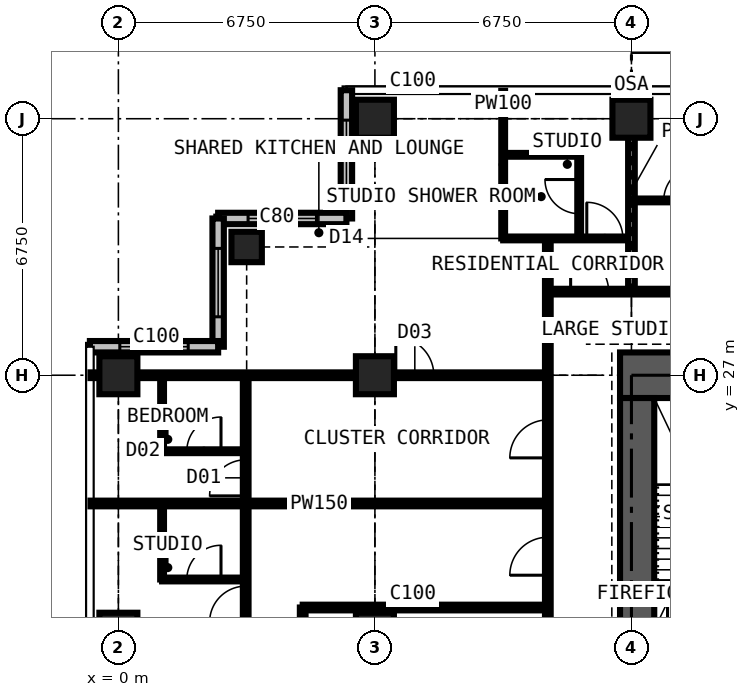
"""IFC4 building model, lengths in metres.
Left out: names, types, materials, properties, quantities, classifications, styles, units other than length and angle.
Written with IfcOpenShell. Run it as: python <this file> out.ifc"""

import sys

from ifc_helpers import new_model, si_unit, direction, frame, frame_2d, origin, origin_2d, place, context, subcontext, project, spatial, rectangle, extrude, element, fill, save


model = new_model("IFC4")
c1 = context("Model", 3, precision=1e-05, world=origin(), true_north=direction((0.0, 1.0)))
c2 = subcontext(c1, "Body", "Model", "MODEL_VIEW")
j1 = project(units=[si_unit("LENGTHUNIT", "METRE"), si_unit("PLANEANGLEUNIT", "RADIAN")], contexts=[c1])
p1 = place(None, origin())
s1 = spatial("IfcSite", under=j1, at=p1, CompositionType="ELEMENT")
p2 = place(p1, origin())
s2 = spatial("IfcBuilding", under=s1, at=p2, CompositionType="ELEMENT")
p3 = place(p2, frame((0.0, 0.0, 229.5)))
s3 = spatial("IfcBuildingStorey", under=s2, at=p3, CompositionType="ELEMENT", Elevation=229.5)
for number, where, z_axis, x_axis in (
    (1, (0.0, 20.25, 0.0), (0.0, 0.0, 1.0), (1.0, 0.0, 0.0)),
    (2, (0.0, 27.0, 0.0), (0.0, 0.0, 1.0), (1.0, 0.0, 0.0)),
):
    element("IfcColumn", number, at=place(p3, frame(where, z_axis=z_axis, x_axis=x_axis)), inside=s3, PredefinedType="COLUMN", context=c2, shape_type="SweptSolid", body=[
        extrude(rectangle(XDim=1.0, YDim=1.0, at=origin_2d()), origin(), (0.0, 0.0, 1.0), 3.6),
    ])
p4 = place(p3, frame((3.375, 30.375, 0.0), z_axis=(0.0, 0.0, 1.0), x_axis=(1.0, 0.0, 0.0)))
e3 = element("IfcColumn", 3, at=p4, inside=s3, PredefinedType="COLUMN", context=c2, shape_type="SweptSolid", body=[
    extrude(rectangle(XDim=0.8, YDim=0.8, at=origin_2d()), origin(), (0.0, 0.0, 1.0), 3.6),
])
for number, where, z_axis, x_axis in (
    (4, (6.75, 20.25, 0.0), (0.0, 0.0, 1.0), (1.0, 0.0, 0.0)),
    (5, (6.75, 27.0, 0.0), (0.0, 0.0, 1.0), (1.0, 0.0, 0.0)),
    (6, (6.75, 33.75, 0.0), (0.0, 0.0, 1.0), (1.0, 0.0, 0.0)),
    (7, (13.5, 33.75, 0.0), (0.0, 0.0, 1.0), (1.0, 0.0, 0.0)),
):
    element("IfcColumn", number, at=place(p3, frame(where, z_axis=z_axis, x_axis=x_axis)), inside=s3, PredefinedType="COLUMN", context=c2, shape_type="SweptSolid", body=[
        extrude(rectangle(XDim=1.0, YDim=1.0, at=origin_2d()), origin(), (0.0, 0.0, 1.0), 3.6),
    ])
p5 = place(p3, frame((27.3, 27.0, 0.0), z_axis=(0.0, 0.0, 1.0), x_axis=(-1.0, 0.0, 0.0)))
e8 = element("IfcWall", 8, at=p5, inside=s3, PredefinedType="SHEAR", context=c2, shape_type="SweptSolid", body=[
    extrude(rectangle(XDim=14.1, YDim=1.2, at=frame_2d((7.05, 0.0))), origin(), (0.0, 0.0, 1.0), 3.6),
])
p6 = place(p5, frame((5.225, 0.0, 0.0)))
e9 = element("IfcOpeningElement", 9, at=p6, cuts=e8, PredefinedType="OPENING", context=c2, shape_type="SweptSolid", body=[
    extrude(rectangle(XDim=0.9, YDim=2.2, at=frame_2d((0.45, 1.1))), frame((0.0, 0.61, 0.0), z_axis=(0.0, -1.0, 0.0), x_axis=(1.0, 0.0, 0.0)), (0.0, 0.0, 1.0), 1.22),
])
p7 = place(p5, frame((8.2, 0.0, 0.0)))
e10 = element("IfcOpeningElement", 10, at=p7, cuts=e8, PredefinedType="OPENING", context=c2, shape_type="SweptSolid", body=[
    extrude(rectangle(XDim=1.0, YDim=2.2, at=frame_2d((0.5, 1.1))), frame((0.0, 0.61, 0.0), z_axis=(0.0, -1.0, 0.0), x_axis=(1.0, 0.0, 0.0)), (0.0, 0.0, 1.0), 1.22),
])
p8 = place(p3, frame((13.65, 26.4, 0.0), z_axis=(0.0, 0.0, 1.0), x_axis=(0.0, -1.0, 0.0)))
e11 = element("IfcWall", 11, at=p8, inside=s3, PredefinedType="SHEAR", context=c2, shape_type="SweptSolid", body=[
    extrude(rectangle(XDim=12.3, YDim=0.9, at=frame_2d((6.15, 0.0))), origin(), (0.0, 0.0, 1.0), 3.6),
])
p9 = place(p8, frame((7.45, 0.0, 0.0)))
e12 = element("IfcOpeningElement", 12, at=p9, cuts=e11, PredefinedType="OPENING", context=c2, shape_type="SweptSolid", body=[
    extrude(rectangle(XDim=1.2, YDim=2.2, at=frame_2d((0.6, 1.1))), frame((0.0, 0.46, 0.0), z_axis=(0.0, -1.0, 0.0), x_axis=(1.0, 0.0, 0.0)), (0.0, 0.0, 1.0), 0.92),
])
p10 = place(p3, frame((6.0, 34.5, 0.0), z_axis=(0.0, 0.0, 1.0), x_axis=(0.0, -1.0, 0.0)))
e13 = element("IfcWall", 13, at=p10, inside=s3, PredefinedType="SOLIDWALL", context=c2, shape_type="SweptSolid", body=[
    extrude(rectangle(XDim=3.375, YDim=0.3, at=frame_2d((1.688, 0.0))), origin(), (0.0, 0.0, 1.0), 3.375),
])
p11 = place(p10, frame((0.788, 0.0, 0.6)))
e14 = element("IfcOpeningElement", 14, at=p11, cuts=e13, PredefinedType="OPENING", context=c2, shape_type="SweptSolid", body=[
    extrude(rectangle(XDim=1.8, YDim=2.1, at=frame_2d((0.9, 1.05))), frame((0.0, 0.16, 0.0), z_axis=(0.0, -1.0, 0.0), x_axis=(1.0, 0.0, 0.0)), (0.0, 0.0, 1.0), 0.32),
])
p12 = place(p3, frame((6.0, 31.125, 0.0), z_axis=(0.0, 0.0, 1.0), x_axis=(-1.0, 0.0, 0.0)))
e15 = element("IfcWall", 15, at=p12, inside=s3, PredefinedType="SOLIDWALL", context=c2, shape_type="SweptSolid", body=[
    extrude(rectangle(XDim=3.375, YDim=0.3, at=frame_2d((1.688, 0.0))), origin(), (0.0, 0.0, 1.0), 3.375),
])
p13 = place(p12, frame((0.788, 0.0, 0.6)))
e16 = element("IfcOpeningElement", 16, at=p13, cuts=e15, PredefinedType="OPENING", context=c2, shape_type="SweptSolid", body=[
    extrude(rectangle(XDim=1.8, YDim=2.1, at=frame_2d((0.9, 1.05))), frame((0.0, 0.16, 0.0), z_axis=(0.0, -1.0, 0.0), x_axis=(1.0, 0.0, 0.0)), (0.0, 0.0, 1.0), 0.32),
])
p14 = place(p3, frame((2.625, 31.125, 0.0), z_axis=(0.0, 0.0, 1.0), x_axis=(0.0, -1.0, 0.0)))
e17 = element("IfcWall", 17, at=p14, inside=s3, PredefinedType="SOLIDWALL", context=c2, shape_type="SweptSolid", body=[
    extrude(rectangle(XDim=3.375, YDim=0.3, at=frame_2d((1.688, 0.0))), origin(), (0.0, 0.0, 1.0), 3.375),
])
p15 = place(p14, frame((0.788, 0.0, 0.6)))
e18 = element("IfcOpeningElement", 18, at=p15, cuts=e17, PredefinedType="OPENING", context=c2, shape_type="SweptSolid", body=[
    extrude(rectangle(XDim=1.8, YDim=2.1, at=frame_2d((0.9, 1.05))), frame((0.0, 0.16, 0.0), z_axis=(0.0, -1.0, 0.0), x_axis=(1.0, 0.0, 0.0)), (0.0, 0.0, 1.0), 0.32),
])
p16 = place(p3, frame((2.625, 27.75, 0.0), z_axis=(0.0, 0.0, 1.0), x_axis=(-1.0, 0.0, 0.0)))
e19 = element("IfcWall", 19, at=p16, inside=s3, PredefinedType="SOLIDWALL", context=c2, shape_type="SweptSolid", body=[
    extrude(rectangle(XDim=3.375, YDim=0.3, at=frame_2d((1.688, 0.0))), origin(), (0.0, 0.0, 1.0), 3.375),
])
p17 = place(p16, frame((0.788, 0.0, 0.6)))
e20 = element("IfcOpeningElement", 20, at=p17, cuts=e19, PredefinedType="OPENING", context=c2, shape_type="SweptSolid", body=[
    extrude(rectangle(XDim=1.8, YDim=2.1, at=frame_2d((0.9, 1.05))), frame((0.0, 0.16, 0.0), z_axis=(0.0, -1.0, 0.0), x_axis=(1.0, 0.0, 0.0)), (0.0, 0.0, 1.0), 0.32),
])
p18 = place(p3, frame((-0.734, 23.625, 0.0), z_axis=(0.0, 0.0, 1.0), x_axis=(1.0, 0.0, 0.0)))
e21 = element("IfcWall", 21, at=p18, inside=s3, PredefinedType="PARTITIONING", context=c2, shape_type="SweptSolid", body=[
    extrude(rectangle(XDim=12.034, YDim=0.15, at=frame_2d((6.017, 0.0))), origin(), (0.0, 0.0, 1.0), 3.375),
])
p19 = place(p3, frame((-0.734, 27.0, 0.0), z_axis=(0.0, 0.0, 1.0), x_axis=(1.0, 0.0, 0.0)))
e22 = element("IfcWall", 22, at=p19, inside=s3, PredefinedType="PARTITIONING", context=c2, shape_type="SweptSolid", body=[
    extrude(rectangle(XDim=12.034, YDim=0.15, at=frame_2d((6.017, 0.0))), origin(), (0.0, 0.0, 1.0), 2.877),
])
p20 = place(p19, frame((8.034, 0.0, 0.0)))
e23 = element("IfcOpeningElement", 23, at=p20, cuts=e22, PredefinedType="OPENING", context=c2, shape_type="SweptSolid", body=[
    extrude(rectangle(XDim=1.0, YDim=2.2, at=frame_2d((0.5, 1.1))), frame((0.0, 0.085, 0.0), z_axis=(0.0, -1.0, 0.0), x_axis=(1.0, 0.0, 0.0)), (0.0, 0.0, 1.0), 0.17),
])
p21 = place(p3, frame((1.15, 21.625, 0.0), z_axis=(0.0, 0.0, 1.0), x_axis=(0.0, 1.0, 0.0)))
e24 = element("IfcWall", 24, at=p21, inside=s3, PredefinedType="PARTITIONING", context=c2, shape_type="SweptSolid", body=[
    extrude(rectangle(XDim=2.0, YDim=0.1, at=frame_2d((1.0, 0.0))), origin(), (0.0, 0.0, 1.0), 3.375),
])
p22 = place(p3, frame((1.15, 21.625, 0.0), z_axis=(0.0, 0.0, 1.0), x_axis=(1.0, 0.0, 0.0)))
e25 = element("IfcWall", 25, at=p22, inside=s3, PredefinedType="PARTITIONING", context=c2, shape_type="SweptSolid", body=[
    extrude(rectangle(XDim=2.2, YDim=0.1, at=frame_2d((1.1, 0.0))), origin(), (0.0, 0.0, 1.0), 3.375),
])
p23 = place(p22, frame((0.65, 0.0, 0.0)))
e26 = element("IfcOpeningElement", 26, at=p23, cuts=e25, PredefinedType="OPENING", context=c2, shape_type="SweptSolid", body=[
    extrude(rectangle(XDim=0.9, YDim=2.2, at=frame_2d((0.45, 1.1))), frame((0.0, 0.06, 0.0), z_axis=(0.0, -1.0, 0.0), x_axis=(1.0, 0.0, 0.0)), (0.0, 0.0, 1.0), 0.12),
])
p24 = place(p3, frame((1.15, 25.0, 0.0), z_axis=(0.0, 0.0, 1.0), x_axis=(0.0, 1.0, 0.0)))
e27 = element("IfcWall", 27, at=p24, inside=s3, PredefinedType="PARTITIONING", context=c2, shape_type="SweptSolid", body=[
    extrude(rectangle(XDim=2.0, YDim=0.1, at=frame_2d((1.0, 0.0))), origin(), (0.0, 0.0, 1.0), 3.375),
])
p25 = place(p3, frame((1.15, 25.0, 0.0), z_axis=(0.0, 0.0, 1.0), x_axis=(1.0, 0.0, 0.0)))
e28 = element("IfcWall", 28, at=p25, inside=s3, PredefinedType="PARTITIONING", context=c2, shape_type="SweptSolid", body=[
    extrude(rectangle(XDim=2.2, YDim=0.1, at=frame_2d((1.1, 0.0))), origin(), (0.0, 0.0, 1.0), 3.375),
])
p26 = place(p25, frame((0.65, 0.0, 0.0)))
e29 = element("IfcOpeningElement", 29, at=p26, cuts=e28, PredefinedType="OPENING", context=c2, shape_type="SweptSolid", body=[
    extrude(rectangle(XDim=0.9, YDim=2.2, at=frame_2d((0.45, 1.1))), frame((0.0, 0.06, 0.0), z_axis=(0.0, -1.0, 0.0), x_axis=(1.0, 0.0, 0.0)), (0.0, 0.0, 1.0), 0.12),
])
p27 = place(p3, frame((3.35, 13.5, 0.0), z_axis=(0.0, 0.0, 1.0), x_axis=(0.0, 1.0, 0.0)))
e30 = element("IfcWall", 30, at=p27, inside=s3, PredefinedType="PARTITIONING", context=c2, shape_type="SweptSolid", body=[
    extrude(rectangle(XDim=13.5, YDim=0.15, at=frame_2d((6.75, 0.0))), origin(), (0.0, 0.0, 1.0), 3.375),
])
p28 = place(p27, frame((10.325, 0.0, 0.0)))
e31 = element("IfcOpeningElement", 31, at=p28, cuts=e30, PredefinedType="OPENING", context=c2, shape_type="SweptSolid", body=[
    extrude(rectangle(XDim=0.95, YDim=2.2, at=frame_2d((0.475, 1.1))), frame((0.0, 0.085, 0.0), z_axis=(0.0, -1.0, 0.0), x_axis=(1.0, 0.0, 0.0)), (0.0, 0.0, 1.0), 0.17),
])
p29 = place(p27, frame((4.2, 0.0, 0.0)))
e32 = element("IfcOpeningElement", 32, at=p29, cuts=e30, PredefinedType="OPENING", context=c2, shape_type="SweptSolid", body=[
    extrude(rectangle(XDim=0.95, YDim=2.2, at=frame_2d((0.475, 1.1))), frame((0.0, 0.085, 0.0), z_axis=(0.0, -1.0, 0.0), x_axis=(1.0, 0.0, 0.0)), (0.0, 0.0, 1.0), 0.17),
])
p30 = place(p27, frame((7.0, 0.0, 0.0)))
e33 = element("IfcOpeningElement", 33, at=p30, cuts=e30, PredefinedType="OPENING", context=c2, shape_type="SweptSolid", body=[
    extrude(rectangle(XDim=0.95, YDim=2.2, at=frame_2d((0.475, 1.1))), frame((0.0, 0.085, 0.0), z_axis=(0.0, -1.0, 0.0), x_axis=(1.0, 0.0, 0.0)), (0.0, 0.0, 1.0), 0.17),
])
p31 = place(p3, frame((4.85, 12.775, 0.0), z_axis=(0.0, 0.0, 1.0), x_axis=(0.0, 1.0, 0.0)))
e34 = element("IfcWall", 34, at=p31, inside=s3, PredefinedType="PARTITIONING", context=c2, shape_type="SweptSolid", body=[
    extrude(rectangle(XDim=8.113, YDim=0.15, at=frame_2d((4.056, 0.0))), origin(), (0.0, 0.0, 1.0), 3.375),
])
p32 = place(p31, frame((3.6, 0.0, 0.0)))
e35 = element("IfcOpeningElement", 35, at=p32, cuts=e34, PredefinedType="OPENING", context=c2, shape_type="SweptSolid", body=[
    extrude(rectangle(XDim=0.95, YDim=2.2, at=frame_2d((0.475, 1.1))), frame((0.0, 0.085, 0.0), z_axis=(0.0, -1.0, 0.0), x_axis=(1.0, 0.0, 0.0)), (0.0, 0.0, 1.0), 0.17),
])
p33 = place(p3, frame((4.85, 20.887, 0.0), z_axis=(0.0, 0.0, 1.0), x_axis=(1.0, 0.0, 0.0)))
e36 = element("IfcWall", 36, at=p33, inside=s3, PredefinedType="PARTITIONING", context=c2, shape_type="SweptSolid", body=[
    extrude(rectangle(XDim=6.45, YDim=0.15, at=frame_2d((3.225, 0.0))), origin(), (0.0, 0.0, 1.0), 3.375),
])
p34 = place(p3, frame((10.125, 30.6, 0.0), z_axis=(0.0, 0.0, 1.0), x_axis=(0.0, 1.0, 0.0)))
e37 = element("IfcWall", 37, at=p34, inside=s3, PredefinedType="PARTITIONING", context=c2, shape_type="SweptSolid", body=[
    extrude(rectangle(XDim=3.884, YDim=0.1, at=frame_2d((1.942, 0.0))), origin(), (0.0, 0.0, 1.0), 3.375),
])
p35 = place(p3, frame((10.125, 30.6, 0.0), z_axis=(0.0, 0.0, 1.0), x_axis=(1.0, 0.0, 0.0)))
e38 = element("IfcWall", 38, at=p35, inside=s3, PredefinedType="PARTITIONING", context=c2, shape_type="SweptSolid", body=[
    extrude(rectangle(XDim=3.375, YDim=0.1, at=frame_2d((1.688, 0.0))), origin(), (0.0, 0.0, 1.0), 3.375),
])
p36 = place(p35, frame((2.2, 0.0, 0.0)))
e39 = element("IfcOpeningElement", 39, at=p36, cuts=e38, PredefinedType="OPENING", context=c2, shape_type="SweptSolid", body=[
    extrude(rectangle(XDim=0.95, YDim=2.2, at=frame_2d((0.475, 1.1))), frame((0.0, 0.06, 0.0), z_axis=(0.0, -1.0, 0.0), x_axis=(1.0, 0.0, 0.0)), (0.0, 0.0, 1.0), 0.12),
])
p37 = place(p3, frame((10.125, 32.8, 0.0), z_axis=(0.0, 0.0, 1.0), x_axis=(1.0, 0.0, 0.0)))
e40 = element("IfcWall", 40, at=p37, inside=s3, PredefinedType="PARTITIONING", context=c2, shape_type="SweptSolid", body=[
    extrude(rectangle(XDim=2.0, YDim=0.1, at=frame_2d((1.0, 0.0))), origin(), (0.0, 0.0, 1.0), 3.375),
])
p38 = place(p3, frame((11.3, 11.3, 0.0), z_axis=(0.0, 0.0, 1.0), x_axis=(0.0, 1.0, 0.0)))
e41 = element("IfcWall", 41, at=p38, inside=s3, PredefinedType="PARTITIONING", context=c2, shape_type="SweptSolid", body=[
    extrude(rectangle(XDim=19.3, YDim=0.15, at=frame_2d((9.65, 0.0))), origin(), (0.0, 0.0, 1.0), 3.375),
])
p39 = place(p38, frame((13.525, 0.0, 0.0)))
e42 = element("IfcOpeningElement", 42, at=p39, cuts=e41, PredefinedType="OPENING", context=c2, shape_type="SweptSolid", body=[
    extrude(rectangle(XDim=1.0, YDim=2.2, at=frame_2d((0.5, 1.1))), frame((0.0, 0.085, 0.0), z_axis=(0.0, -1.0, 0.0), x_axis=(1.0, 0.0, 0.0)), (0.0, 0.0, 1.0), 0.17),
])
p40 = place(p38, frame((10.438, 0.0, 0.0)))
e43 = element("IfcOpeningElement", 43, at=p40, cuts=e41, PredefinedType="OPENING", context=c2, shape_type="SweptSolid", body=[
    extrude(rectangle(XDim=1.0, YDim=2.2, at=frame_2d((0.5, 1.1))), frame((0.0, 0.085, 0.0), z_axis=(0.0, -1.0, 0.0), x_axis=(1.0, 0.0, 0.0)), (0.0, 0.0, 1.0), 0.17),
])
p41 = place(p3, frame((11.3, 29.2, 0.0), z_axis=(0.0, 0.0, 1.0), x_axis=(1.0, 0.0, 0.0)))
e44 = element("IfcWall", 44, at=p41, inside=s3, PredefinedType="PARTITIONING", context=c2, shape_type="SweptSolid", body=[
    extrude(rectangle(XDim=19.809, YDim=0.15, at=frame_2d((9.904, 0.0))), origin(), (0.0, 0.0, 1.0), 3.375),
])
p42 = place(p41, frame((12.9, 0.0, 0.0)))
e45 = element("IfcOpeningElement", 45, at=p42, cuts=e44, PredefinedType="OPENING", context=c2, shape_type="SweptSolid", body=[
    extrude(rectangle(XDim=1.0, YDim=2.2, at=frame_2d((0.5, 1.1))), frame((0.0, 0.085, 0.0), z_axis=(0.0, -1.0, 0.0), x_axis=(1.0, 0.0, 0.0)), (0.0, 0.0, 1.0), 0.17),
])
p43 = place(p41, frame((6.4, 0.0, 0.0)))
e46 = element("IfcOpeningElement", 46, at=p43, cuts=e44, PredefinedType="OPENING", context=c2, shape_type="SweptSolid", body=[
    extrude(rectangle(XDim=0.95, YDim=2.2, at=frame_2d((0.475, 1.1))), frame((0.0, 0.085, 0.0), z_axis=(0.0, -1.0, 0.0), x_axis=(1.0, 0.0, 0.0)), (0.0, 0.0, 1.0), 0.17),
])
p44 = place(p41, frame((0.6, 0.0, 0.0)))
e47 = element("IfcOpeningElement", 47, at=p44, cuts=e44, PredefinedType="OPENING", context=c2, shape_type="SweptSolid", body=[
    extrude(rectangle(XDim=1.0, YDim=2.2, at=frame_2d((0.5, 1.1))), frame((0.0, 0.085, 0.0), z_axis=(0.0, -1.0, 0.0), x_axis=(1.0, 0.0, 0.0)), (0.0, 0.0, 1.0), 0.17),
])
p45 = place(p3, frame((12.125, 30.6, 0.0), z_axis=(0.0, 0.0, 1.0), x_axis=(0.0, 1.0, 0.0)))
e48 = element("IfcWall", 48, at=p45, inside=s3, PredefinedType="PARTITIONING", context=c2, shape_type="SweptSolid", body=[
    extrude(rectangle(XDim=2.2, YDim=0.1, at=frame_2d((1.1, 0.0))), origin(), (0.0, 0.0, 1.0), 3.375),
])
p46 = place(p45, frame((0.65, 0.0, 0.0)))
e49 = element("IfcOpeningElement", 49, at=p46, cuts=e48, PredefinedType="OPENING", context=c2, shape_type="SweptSolid", body=[
    extrude(rectangle(XDim=0.9, YDim=2.2, at=frame_2d((0.45, 1.1))), frame((0.0, 0.06, 0.0), z_axis=(0.0, -1.0, 0.0), x_axis=(1.0, 0.0, 0.0)), (0.0, 0.0, 1.0), 0.12),
])
p47 = place(p3, frame((13.5, 29.2, 0.0), z_axis=(0.0, 0.0, 1.0), x_axis=(0.0, 1.0, 0.0)))
e50 = element("IfcWall", 50, at=p47, inside=s3, PredefinedType="PARTITIONING", context=c2, shape_type="SweptSolid", body=[
    extrude(rectangle(XDim=5.284, YDim=0.175, at=frame_2d((2.642, 0.0))), origin(), (0.0, 0.0, 1.0), 2.61),
])
p48 = place(p3, frame((13.5, 31.6, 0.0), z_axis=(0.0, 0.0, 1.0), x_axis=(1.0, 0.0, 0.0)))
e51 = element("IfcWall", 51, at=p48, inside=s3, PredefinedType="PARTITIONING", context=c2, shape_type="SweptSolid", body=[
    extrude(rectangle(XDim=2.6, YDim=0.1, at=frame_2d((1.3, 0.0))), origin(), (0.0, 0.0, 1.0), 3.375),
])
p49 = place(p48, frame((0.85, 0.0, 0.0)))
e52 = element("IfcOpeningElement", 52, at=p49, cuts=e51, PredefinedType="OPENING", context=c2, shape_type="SweptSolid", body=[
    extrude(rectangle(XDim=0.9, YDim=2.2, at=frame_2d((0.45, 1.1))), frame((0.0, 0.06, 0.0), z_axis=(0.0, -1.0, 0.0), x_axis=(1.0, 0.0, 0.0)), (0.0, 0.0, 1.0), 0.12),
])
p50 = place(p11, origin())
e53 = element("IfcWindow", 53, at=p50, inside=s3, PartitioningType="SINGLE_PANEL", PredefinedType="WINDOW", context=c2, shape_type="SweptSolid", body=[
    extrude(rectangle(XDim=1.8, YDim=2.1, at=frame_2d((0.9, 1.05))), frame((0.0, 0.03, 0.0), z_axis=(0.0, -1.0, 0.0), x_axis=(1.0, 0.0, 0.0)), (0.0, 0.0, 1.0), 0.06),
])
fill(e14, e53)
p51 = place(p13, origin())
e54 = element("IfcWindow", 54, at=p51, inside=s3, PartitioningType="SINGLE_PANEL", PredefinedType="WINDOW", context=c2, shape_type="SweptSolid", body=[
    extrude(rectangle(XDim=1.8, YDim=2.1, at=frame_2d((0.9, 1.05))), frame((0.0, 0.03, 0.0), z_axis=(0.0, -1.0, 0.0), x_axis=(1.0, 0.0, 0.0)), (0.0, 0.0, 1.0), 0.06),
])
fill(e16, e54)
p52 = place(p15, origin())
e55 = element("IfcWindow", 55, at=p52, inside=s3, PartitioningType="SINGLE_PANEL", PredefinedType="WINDOW", context=c2, shape_type="SweptSolid", body=[
    extrude(rectangle(XDim=1.8, YDim=2.1, at=frame_2d((0.9, 1.05))), frame((0.0, 0.03, 0.0), z_axis=(0.0, -1.0, 0.0), x_axis=(1.0, 0.0, 0.0)), (0.0, 0.0, 1.0), 0.06),
])
fill(e18, e55)
p53 = place(p17, origin())
e56 = element("IfcWindow", 56, at=p53, inside=s3, PartitioningType="SINGLE_PANEL", PredefinedType="WINDOW", context=c2, shape_type="SweptSolid", body=[
    extrude(rectangle(XDim=1.8, YDim=2.1, at=frame_2d((0.9, 1.05))), frame((0.0, 0.03, 0.0), z_axis=(0.0, -1.0, 0.0), x_axis=(1.0, 0.0, 0.0)), (0.0, 0.0, 1.0), 0.06),
])
fill(e20, e56)
p54 = place(p49, origin())
e57 = element("IfcDoor", 57, at=p54, inside=s3, OperationType="SINGLE_SWING_RIGHT", PredefinedType="DOOR", context=c2, shape_type="SweptSolid", body=[
    extrude(rectangle(XDim=0.9, YDim=2.2, at=frame_2d((0.45, 1.1))), frame((0.0, 0.025, 0.0), z_axis=(0.0, -1.0, 0.0), x_axis=(1.0, 0.0, 0.0)), (0.0, 0.0, 1.0), 0.05),
])
fill(e52, e57)
p55 = place(p36, origin())
e58 = element("IfcDoor", 58, at=p55, inside=s3, OperationType="SINGLE_SWING_LEFT", PredefinedType="DOOR", context=c2, shape_type="SweptSolid", body=[
    extrude(rectangle(XDim=0.95, YDim=2.2, at=frame_2d((0.475, 1.1))), frame((0.0, 0.025, 0.0), z_axis=(0.0, -1.0, 0.0), x_axis=(1.0, 0.0, 0.0)), (0.0, 0.0, 1.0), 0.05),
])
fill(e39, e58)
p56 = place(p46, origin())
e59 = element("IfcDoor", 59, at=p56, inside=s3, OperationType="SINGLE_SWING_RIGHT", PredefinedType="DOOR", context=c2, shape_type="SweptSolid", body=[
    extrude(rectangle(XDim=0.9, YDim=2.2, at=frame_2d((0.45, 1.1))), frame((0.0, 0.025, 0.0), z_axis=(0.0, -1.0, 0.0), x_axis=(1.0, 0.0, 0.0)), (0.0, 0.0, 1.0), 0.05),
])
fill(e49, e59)
p57 = place(p44, origin())
e60 = element("IfcDoor", 60, at=p57, inside=s3, OperationType="SINGLE_SWING_LEFT", PredefinedType="DOOR", context=c2, shape_type="SweptSolid", body=[
    extrude(rectangle(XDim=1.0, YDim=2.2, at=frame_2d((0.5, 1.1))), frame((0.0, 0.025, 0.0), z_axis=(0.0, -1.0, 0.0), x_axis=(1.0, 0.0, 0.0)), (0.0, 0.0, 1.0), 0.05),
])
fill(e47, e60)
p58 = place(p20, origin())
e61 = element("IfcDoor", 61, at=p58, inside=s3, OperationType="SINGLE_SWING_LEFT", PredefinedType="DOOR", context=c2, shape_type="SweptSolid", body=[
    extrude(rectangle(XDim=1.0, YDim=2.2, at=frame_2d((0.5, 1.1))), frame((0.0, 0.025, 0.0), z_axis=(0.0, -1.0, 0.0), x_axis=(1.0, 0.0, 0.0)), (0.0, 0.0, 1.0), 0.05),
])
fill(e23, e61)
p59 = place(p28, origin())
e62 = element("IfcDoor", 62, at=p59, inside=s3, OperationType="SINGLE_SWING_LEFT", PredefinedType="DOOR", context=c2, shape_type="SweptSolid", body=[
    extrude(rectangle(XDim=0.95, YDim=2.2, at=frame_2d((0.475, 1.1))), frame((0.0, 0.025, 0.0), z_axis=(0.0, -1.0, 0.0), x_axis=(1.0, 0.0, 0.0)), (0.0, 0.0, 1.0), 0.05),
])
fill(e31, e62)
p60 = place(p26, origin())
e63 = element("IfcDoor", 63, at=p60, inside=s3, OperationType="SINGLE_SWING_RIGHT", PredefinedType="DOOR", context=c2, shape_type="SweptSolid", body=[
    extrude(rectangle(XDim=0.9, YDim=2.2, at=frame_2d((0.45, 1.1))), frame((0.0, 0.025, 0.0), z_axis=(0.0, -1.0, 0.0), x_axis=(1.0, 0.0, 0.0)), (0.0, 0.0, 1.0), 0.05),
])
fill(e29, e63)
p61 = place(p39, origin())
e64 = element("IfcDoor", 64, at=p61, inside=s3, OperationType="SINGLE_SWING_LEFT", PredefinedType="DOOR", context=c2, shape_type="SweptSolid", body=[
    extrude(rectangle(XDim=1.0, YDim=2.2, at=frame_2d((0.5, 1.1))), frame((0.0, 0.025, 0.0), z_axis=(0.0, -1.0, 0.0), x_axis=(1.0, 0.0, 0.0)), (0.0, 0.0, 1.0), 0.05),
])
fill(e42, e64)
p62 = place(p30, origin())
e65 = element("IfcDoor", 65, at=p62, inside=s3, OperationType="SINGLE_SWING_LEFT", PredefinedType="DOOR", context=c2, shape_type="SweptSolid", body=[
    extrude(rectangle(XDim=0.95, YDim=2.2, at=frame_2d((0.475, 1.1))), frame((0.0, 0.025, 0.0), z_axis=(0.0, -1.0, 0.0), x_axis=(1.0, 0.0, 0.0)), (0.0, 0.0, 1.0), 0.05),
])
fill(e33, e65)
p63 = place(p23, origin())
e66 = element("IfcDoor", 66, at=p63, inside=s3, OperationType="SINGLE_SWING_RIGHT", PredefinedType="DOOR", context=c2, shape_type="SweptSolid", body=[
    extrude(rectangle(XDim=0.9, YDim=2.2, at=frame_2d((0.45, 1.1))), frame((0.0, 0.025, 0.0), z_axis=(0.0, -1.0, 0.0), x_axis=(1.0, 0.0, 0.0)), (0.0, 0.0, 1.0), 0.05),
])
fill(e26, e66)
p64 = place(p40, origin())
e67 = element("IfcDoor", 67, at=p64, inside=s3, OperationType="SINGLE_SWING_LEFT", PredefinedType="DOOR", context=c2, shape_type="SweptSolid", body=[
    extrude(rectangle(XDim=1.0, YDim=2.2, at=frame_2d((0.5, 1.1))), frame((0.0, 0.025, 0.0), z_axis=(0.0, -1.0, 0.0), x_axis=(1.0, 0.0, 0.0)), (0.0, 0.0, 1.0), 0.05),
])
fill(e43, e67)
save(model, sys.argv[1])
